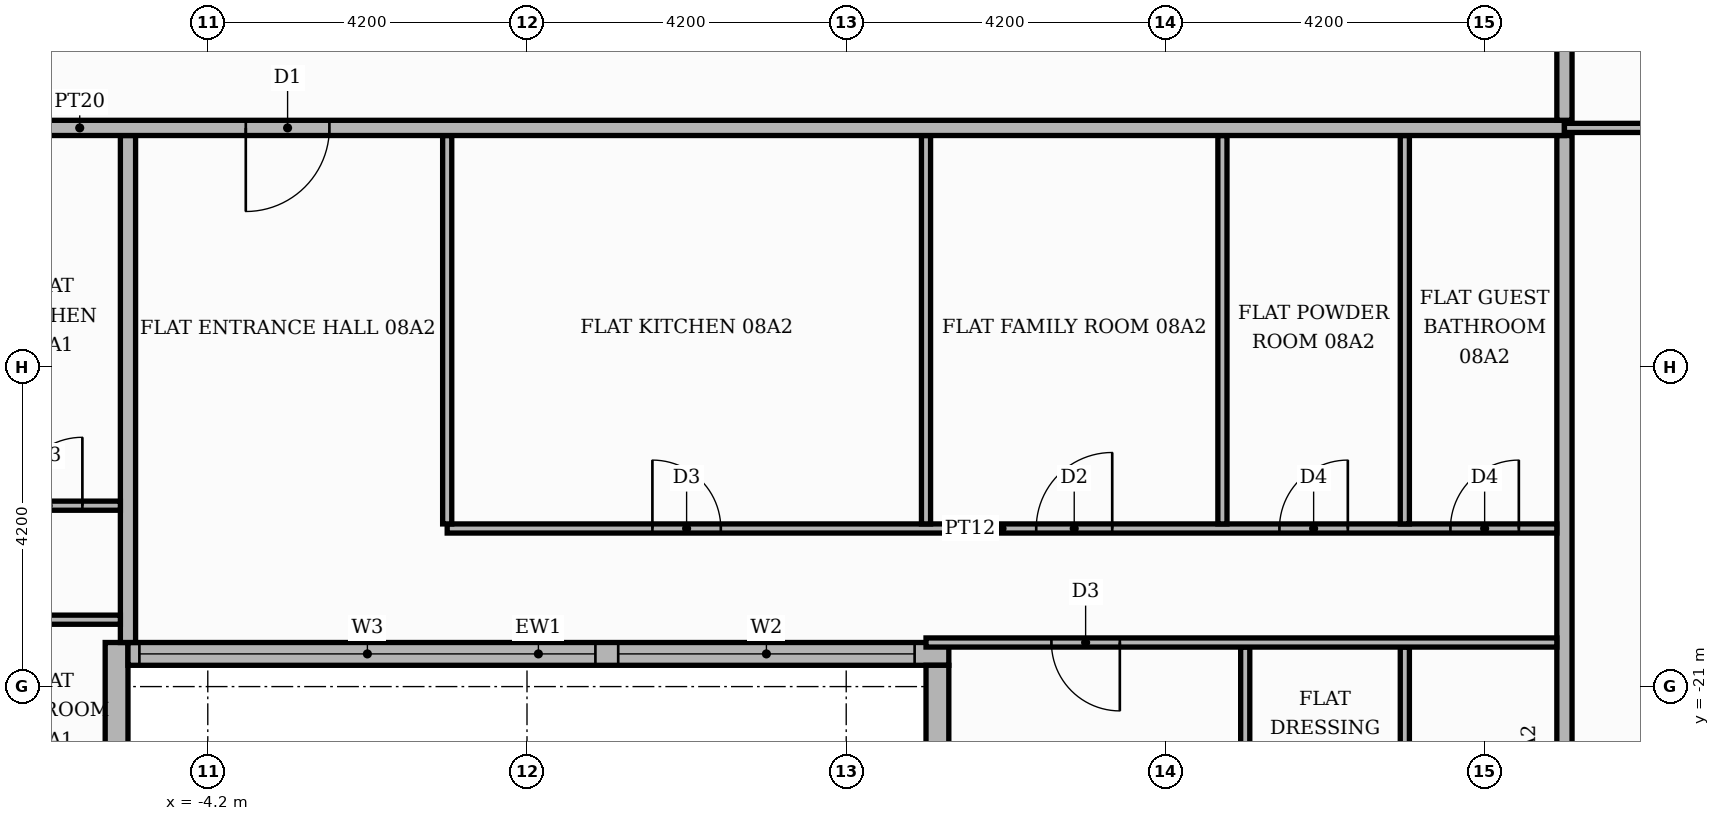
"""IFC4 building model, lengths in metres.
Left out: names, types, materials, properties, quantities, classifications, styles, units other than length and angle.
Written with IfcOpenShell. Run it as: python <this file> out.ifc"""

import sys

from ifc_helpers import new_model, si_unit, direction, frame, frame_2d, origin, place, context, subcontext, project, spatial, rectangle, extrude, element, fill, save


model = new_model("IFC4")
c1 = context("Model", 3, precision=1e-05, world=origin(), true_north=direction((0.0, 1.0)))
c2 = subcontext(c1, "Body", "Model", "MODEL_VIEW")
j1 = project(units=[si_unit("LENGTHUNIT", "METRE"), si_unit("PLANEANGLEUNIT", "RADIAN")], contexts=[c1])
p1 = place(None, origin())
s1 = spatial("IfcSite", under=j1, at=p1, CompositionType="ELEMENT")
p2 = place(p1, origin())
s2 = spatial("IfcBuilding", under=s1, at=p2, CompositionType="ELEMENT")
p3 = place(p2, frame((0.0, 0.0, 38.7)))
s3 = spatial("IfcBuildingStorey", under=s2, at=p3, CompositionType="ELEMENT", Elevation=38.7)
p4 = place(p3, frame((-5.4, -25.42, 0.0), z_axis=(0.0, 0.0, 1.0), x_axis=(0.0, 1.0, 0.0)))
e1 = element("IfcWall", 1, at=p4, inside=s3, PredefinedType="STANDARD", context=c2, shape_type="SweptSolid", body=[
    extrude(rectangle(XDim=5.0, YDim=0.3, at=frame_2d((2.5, 0.0))), origin(), (0.0, 0.0, 1.0), 3.48),
])
p5 = place(p4, frame((1.42, 0.0, 0.9)))
e2 = element("IfcOpeningElement", 2, at=p5, cuts=e1, PredefinedType="OPENING", context=c2, shape_type="SweptSolid", body=[
    extrude(rectangle(XDim=1.8, YDim=2.1, at=frame_2d((0.9, 1.05))), frame((0.0, 0.16, 0.0), z_axis=(0.0, -1.0, 0.0), x_axis=(1.0, 0.0, 0.0)), (0.0, 0.0, 1.0), 0.32),
])
p6 = place(p3, frame((-5.25, -20.57, 0.0), z_axis=(0.0, 0.0, 1.0), x_axis=(1.0, 0.0, 0.0)))
e3 = element("IfcWall", 3, at=p6, inside=s3, PredefinedType="STANDARD", context=c2, shape_type="SweptSolid", body=[
    extrude(rectangle(XDim=10.8, YDim=0.3, at=frame_2d((5.4, 0.0))), origin(), (0.0, 0.0, 1.0), 3.48),
])
p7 = place(p6, frame((0.15, 0.0, 0.9)))
e4 = element("IfcOpeningElement", 4, at=p7, cuts=e3, PredefinedType="OPENING", context=c2, shape_type="SweptSolid", body=[
    extrude(rectangle(XDim=6.0, YDim=2.1, at=frame_2d((3.0, 1.05))), frame((0.0, 0.16, 0.0), z_axis=(0.0, -1.0, 0.0), x_axis=(1.0, 0.0, 0.0)), (0.0, 0.0, 1.0), 0.32),
])
p8 = place(p6, frame((6.45, 0.0, 0.9)))
e5 = element("IfcOpeningElement", 5, at=p8, cuts=e3, PredefinedType="OPENING", context=c2, shape_type="SweptSolid", body=[
    extrude(rectangle(XDim=3.9, YDim=2.1, at=frame_2d((1.95, 1.05))), frame((0.0, 0.16, 0.0), z_axis=(0.0, -1.0, 0.0), x_axis=(1.0, 0.0, 0.0)), (0.0, 0.0, 1.0), 0.32),
])
p9 = place(p3, frame((5.4, -20.72, 0.0), z_axis=(0.0, 0.0, 1.0), x_axis=(0.0, -1.0, 0.0)))
e6 = element("IfcWall", 6, at=p9, inside=s3, PredefinedType="STANDARD", context=c2, shape_type="SweptSolid", body=[
    extrude(rectangle(XDim=5.0, YDim=0.3, at=frame_2d((2.5, 0.0))), origin(), (0.0, 0.0, 1.0), 3.48),
])
p10 = place(p9, frame((1.48, 0.0, 0.9)))
e7 = element("IfcOpeningElement", 7, at=p10, cuts=e6, PredefinedType="OPENING", context=c2, shape_type="SweptSolid", body=[
    extrude(rectangle(XDim=1.8, YDim=2.1, at=frame_2d((0.9, 1.05))), frame((0.0, 0.16, 0.0), z_axis=(0.0, -1.0, 0.0), x_axis=(1.0, 0.0, 0.0)), (0.0, 0.0, 1.0), 0.32),
])
p11 = place(p3, frame((9.45, -25.42, 0.0), z_axis=(0.0, 0.0, 1.0), x_axis=(0.0, 1.0, 0.0)))
e8 = element("IfcWall", 8, at=p11, inside=s3, PredefinedType="PARTITIONING", context=c2, shape_type="SweptSolid", body=[
    extrude(rectangle(XDim=4.94, YDim=0.12, at=frame_2d((2.47, 0.0))), origin(), (0.0, 0.0, 1.0), 3.48),
])
p12 = place(p11, frame((1.9, 0.0, 0.0)))
e9 = element("IfcOpeningElement", 9, at=p12, cuts=e8, PredefinedType="OPENING", context=c2, shape_type="SweptSolid", body=[
    extrude(rectangle(XDim=0.9, YDim=2.1, at=frame_2d((0.45, 1.05))), frame((0.0, 0.07, 0.0), z_axis=(0.0, -1.0, 0.0), x_axis=(1.0, 0.0, 0.0)), (0.0, 0.0, 1.0), 0.14),
])
p13 = place(p3, frame((11.55, -25.42, 0.0), z_axis=(0.0, 0.0, 1.0), x_axis=(0.0, 1.0, 0.0)))
e10 = element("IfcWall", 10, at=p13, inside=s3, PredefinedType="PARTITIONING", context=c2, shape_type="SweptSolid", body=[
    extrude(rectangle(XDim=4.94, YDim=0.12, at=frame_2d((2.47, 0.0))), origin(), (0.0, 0.0, 1.0), 3.48),
])
p14 = place(p13, frame((1.9, 0.0, 0.0)))
e11 = element("IfcOpeningElement", 11, at=p14, cuts=e10, PredefinedType="OPENING", context=c2, shape_type="SweptSolid", body=[
    extrude(rectangle(XDim=0.9, YDim=2.1, at=frame_2d((0.45, 1.05))), frame((0.0, 0.07, 0.0), z_axis=(0.0, -1.0, 0.0), x_axis=(1.0, 0.0, 0.0)), (0.0, 0.0, 1.0), 0.14),
])
p15 = place(p3, frame((13.65, -25.42, 0.0), z_axis=(0.0, 0.0, 1.0), x_axis=(0.0, 1.0, 0.0)))
e12 = element("IfcWall", 12, at=p15, inside=s3, PredefinedType="PARTITIONING", context=c2, shape_type="SweptSolid", body=[
    extrude(rectangle(XDim=11.67, YDim=0.2, at=frame_2d((5.835, 0.0))), origin(), (0.0, 0.0, 1.0), 3.48),
])
p16 = place(p3, frame((-5.25, -20.42, 0.0), z_axis=(0.0, 0.0, 1.0), x_axis=(0.0, 1.0, 0.0)))
e13 = element("IfcWall", 13, at=p16, inside=s3, PredefinedType="PARTITIONING", context=c2, shape_type="SweptSolid", body=[
    extrude(rectangle(XDim=6.67, YDim=0.2, at=frame_2d((3.335, 0.0))), origin(), (0.0, 0.0, 1.0), 3.48),
])
p17 = place(p3, frame((5.25, -20.42, 0.0), z_axis=(0.0, 0.0, 1.0), x_axis=(1.0, 0.0, 0.0)))
e14 = element("IfcWall", 14, at=p17, inside=s3, PredefinedType="PARTITIONING", context=c2, shape_type="SweptSolid", body=[
    extrude(rectangle(XDim=8.3, YDim=0.12, at=frame_2d((4.15, 0.0))), origin(), (0.0, 0.0, 1.0), 3.48),
])
p18 = place(p17, frame((1.65, 0.0, 0.0)))
e15 = element("IfcOpeningElement", 15, at=p18, cuts=e14, PredefinedType="OPENING", context=c2, shape_type="SweptSolid", body=[
    extrude(rectangle(XDim=0.9, YDim=2.1, at=frame_2d((0.45, 1.05))), frame((0.0, 0.07, 0.0), z_axis=(0.0, -1.0, 0.0), x_axis=(1.0, 0.0, 0.0)), (0.0, 0.0, 1.0), 0.14),
])
p19 = place(p3, frame((-17.3, -20.12, 0.0), z_axis=(0.0, 0.0, 1.0), x_axis=(1.0, 0.0, 0.0)))
e16 = element("IfcWall", 16, at=p19, inside=s3, PredefinedType="PARTITIONING", context=c2, shape_type="SweptSolid", body=[
    extrude(rectangle(XDim=11.95, YDim=0.12, at=frame_2d((5.975, 0.0))), origin(), (0.0, 0.0, 1.0), 3.48),
])
p20 = place(p19, frame((2.1, 0.0, 0.0)))
e17 = element("IfcOpeningElement", 17, at=p20, cuts=e16, PredefinedType="OPENING", context=c2, shape_type="SweptSolid", body=[
    extrude(rectangle(XDim=1.0, YDim=2.1, at=frame_2d((0.5, 1.05))), frame((0.0, 0.07, 0.0), z_axis=(0.0, -1.0, 0.0), x_axis=(1.0, 0.0, 0.0)), (0.0, 0.0, 1.0), 0.14),
])
p21 = place(p19, frame((5.3, 0.0, 0.0)))
e18 = element("IfcOpeningElement", 18, at=p21, cuts=e16, PredefinedType="OPENING", context=c2, shape_type="SweptSolid", body=[
    extrude(rectangle(XDim=0.9, YDim=2.1, at=frame_2d((0.45, 1.05))), frame((0.0, 0.07, 0.0), z_axis=(0.0, -1.0, 0.0), x_axis=(1.0, 0.0, 0.0)), (0.0, 0.0, 1.0), 0.14),
])
p22 = place(p3, frame((-1.05, -18.92, 0.0), z_axis=(0.0, 0.0, 1.0), x_axis=(1.0, 0.0, 0.0)))
e19 = element("IfcWall", 19, at=p22, inside=s3, PredefinedType="PARTITIONING", context=c2, shape_type="SweptSolid", body=[
    extrude(rectangle(XDim=14.6, YDim=0.12, at=frame_2d((7.3, 0.0))), origin(), (0.0, 0.0, 1.0), 3.48),
])
p23 = place(p22, frame((2.7, 0.0, 0.0)))
e20 = element("IfcOpeningElement", 20, at=p23, cuts=e19, PredefinedType="OPENING", context=c2, shape_type="SweptSolid", body=[
    extrude(rectangle(XDim=0.9, YDim=2.1, at=frame_2d((0.45, 1.05))), frame((0.0, 0.07, 0.0), z_axis=(0.0, -1.0, 0.0), x_axis=(1.0, 0.0, 0.0)), (0.0, 0.0, 1.0), 0.14),
])
p24 = place(p22, frame((7.75, 0.0, 0.0)))
e21 = element("IfcOpeningElement", 21, at=p24, cuts=e19, PredefinedType="OPENING", context=c2, shape_type="SweptSolid", body=[
    extrude(rectangle(XDim=1.0, YDim=2.1, at=frame_2d((0.5, 1.05))), frame((0.0, 0.07, 0.0), z_axis=(0.0, -1.0, 0.0), x_axis=(1.0, 0.0, 0.0)), (0.0, 0.0, 1.0), 0.14),
])
p25 = place(p22, frame((10.95, 0.0, 0.0)))
e22 = element("IfcOpeningElement", 22, at=p25, cuts=e19, PredefinedType="OPENING", context=c2, shape_type="SweptSolid", body=[
    extrude(rectangle(XDim=0.9, YDim=2.1, at=frame_2d((0.45, 1.05))), frame((0.0, 0.07, 0.0), z_axis=(0.0, -1.0, 0.0), x_axis=(1.0, 0.0, 0.0)), (0.0, 0.0, 1.0), 0.14),
])
p26 = place(p22, frame((13.2, 0.0, 0.0)))
e23 = element("IfcOpeningElement", 23, at=p26, cuts=e19, PredefinedType="OPENING", context=c2, shape_type="SweptSolid", body=[
    extrude(rectangle(XDim=0.9, YDim=2.1, at=frame_2d((0.45, 1.05))), frame((0.0, 0.07, 0.0), z_axis=(0.0, -1.0, 0.0), x_axis=(1.0, 0.0, 0.0)), (0.0, 0.0, 1.0), 0.14),
])
for number, where, z_axis, x_axis in (
    (24, (-1.05, -18.86, 0.0), (0.0, 0.0, 1.0), (0.0, 1.0, 0.0)),
    (25, (5.25, -18.86, 0.0), (0.0, 0.0, 1.0), (0.0, 1.0, 0.0)),
    (26, (9.15, -18.86, 0.0), (0.0, 0.0, 1.0), (0.0, 1.0, 0.0)),
    (27, (11.55, -18.86, 0.0), (0.0, 0.0, 1.0), (0.0, 1.0, 0.0)),
):
    element("IfcWall", number, at=place(p3, frame(where, z_axis=z_axis, x_axis=x_axis)), inside=s3, PredefinedType="PARTITIONING", context=c2, shape_type="SweptSolid", body=[
        extrude(rectangle(XDim=5.11, YDim=0.12, at=frame_2d((2.555, 0.0))), origin(), (0.0, 0.0, 1.0), 3.48),
    ])
p27 = place(p3, frame((-9.45, -18.62, 0.0), z_axis=(0.0, 0.0, 1.0), x_axis=(1.0, 0.0, 0.0)))
e28 = element("IfcWall", 28, at=p27, inside=s3, PredefinedType="PARTITIONING", context=c2, shape_type="SweptSolid", body=[
    extrude(rectangle(XDim=4.1, YDim=0.12, at=frame_2d((2.05, 0.0))), origin(), (0.0, 0.0, 1.0), 3.48),
])
p28 = place(p27, frame((2.7, 0.0, 0.0)))
e29 = element("IfcOpeningElement", 29, at=p28, cuts=e28, PredefinedType="OPENING", context=c2, shape_type="SweptSolid", body=[
    extrude(rectangle(XDim=0.9, YDim=2.1, at=frame_2d((0.45, 1.05))), frame((0.0, 0.07, 0.0), z_axis=(0.0, -1.0, 0.0), x_axis=(1.0, 0.0, 0.0)), (0.0, 0.0, 1.0), 0.14),
])
p29 = place(p3, frame((-25.42, -13.65, 0.0), z_axis=(0.0, 0.0, 1.0), x_axis=(1.0, 0.0, 0.0)))
e30 = element("IfcWall", 30, at=p29, inside=s3, PredefinedType="PARTITIONING", context=c2, shape_type="SweptSolid", body=[
    extrude(rectangle(XDim=39.07, YDim=0.2, at=frame_2d((19.535, 0.0))), origin(), (0.0, 0.0, 1.0), 3.48),
])
p30 = place(p29, frame((13.32, 0.0, 0.0)))
e31 = element("IfcOpeningElement", 31, at=p30, cuts=e30, PredefinedType="OPENING", context=c2, shape_type="SweptSolid", body=[
    extrude(rectangle(XDim=1.1, YDim=2.4, at=frame_2d((0.55, 1.2))), frame((0.0, 0.11, 0.0), z_axis=(0.0, -1.0, 0.0), x_axis=(1.0, 0.0, 0.0)), (0.0, 0.0, 1.0), 0.22),
])
p31 = place(p29, frame((21.72, 0.0, 0.0)))
e32 = element("IfcOpeningElement", 32, at=p31, cuts=e30, PredefinedType="OPENING", context=c2, shape_type="SweptSolid", body=[
    extrude(rectangle(XDim=1.1, YDim=2.4, at=frame_2d((0.55, 1.2))), frame((0.0, 0.11, 0.0), z_axis=(0.0, -1.0, 0.0), x_axis=(1.0, 0.0, 0.0)), (0.0, 0.0, 1.0), 0.22),
])
p32 = place(p3, frame((13.65, -13.65, 0.0), z_axis=(0.0, 0.0, 1.0), x_axis=(1.0, 0.0, 0.0)))
e33 = element("IfcWall", 33, at=p32, inside=s3, PredefinedType="PARTITIONING", context=c2, shape_type="SweptSolid", body=[
    extrude(rectangle(XDim=6.17, YDim=0.12, at=frame_2d((3.085, 0.0))), origin(), (0.0, 0.0, 1.0), 3.48),
])
p33 = place(p32, frame((2.585, 0.0, 0.0)))
e34 = element("IfcOpeningElement", 34, at=p33, cuts=e33, PredefinedType="OPENING", context=c2, shape_type="SweptSolid", body=[
    extrude(rectangle(XDim=1.0, YDim=2.1, at=frame_2d((0.5, 1.05))), frame((0.0, 0.07, 0.0), z_axis=(0.0, -1.0, 0.0), x_axis=(1.0, 0.0, 0.0)), (0.0, 0.0, 1.0), 0.14),
])
p34 = place(p3, frame((13.65, -13.55, 0.0), z_axis=(0.0, 0.0, 1.0), x_axis=(0.0, 1.0, 0.0)))
e35 = element("IfcWall", 35, at=p34, inside=s3, PredefinedType="PARTITIONING", context=c2, shape_type="SweptSolid", body=[
    extrude(rectangle(XDim=27.1, YDim=0.2, at=frame_2d((13.55, 0.0))), origin(), (0.0, 0.0, 1.0), 3.48),
])
p35 = place(p34, frame((2.5, 0.0, 0.0)))
e36 = element("IfcOpeningElement", 36, at=p35, cuts=e35, PredefinedType="OPENING", context=c2, shape_type="SweptSolid", body=[
    extrude(rectangle(XDim=1.1, YDim=2.4, at=frame_2d((0.55, 1.2))), frame((0.0, 0.11, 0.0), z_axis=(0.0, -1.0, 0.0), x_axis=(1.0, 0.0, 0.0)), (0.0, 0.0, 1.0), 0.22),
])
p36 = place(p7, origin())
e37 = element("IfcWindow", 37, at=p36, inside=s3, PartitioningType="SINGLE_PANEL", PredefinedType="WINDOW", context=c2, shape_type="SweptSolid", body=[
    extrude(rectangle(XDim=6.0, YDim=2.1, at=frame_2d((3.0, 1.05))), frame((0.0, 0.03, 0.0), z_axis=(0.0, -1.0, 0.0), x_axis=(1.0, 0.0, 0.0)), (0.0, 0.0, 1.0), 0.06),
])
fill(e4, e37)
p37 = place(p8, origin())
e38 = element("IfcWindow", 38, at=p37, inside=s3, PartitioningType="SINGLE_PANEL", PredefinedType="WINDOW", context=c2, shape_type="SweptSolid", body=[
    extrude(rectangle(XDim=3.9, YDim=2.1, at=frame_2d((1.95, 1.05))), frame((0.0, 0.03, 0.0), z_axis=(0.0, -1.0, 0.0), x_axis=(1.0, 0.0, 0.0)), (0.0, 0.0, 1.0), 0.06),
])
fill(e5, e38)
p38 = place(p28, origin())
e39 = element("IfcDoor", 39, at=p38, inside=s3, OperationType="SINGLE_SWING_RIGHT", PredefinedType="DOOR", context=c2, shape_type="SweptSolid", body=[
    extrude(rectangle(XDim=0.9, YDim=2.1, at=frame_2d((0.45, 1.05))), frame((0.0, 0.025, 0.0), z_axis=(0.0, -1.0, 0.0), x_axis=(1.0, 0.0, 0.0)), (0.0, 0.0, 1.0), 0.05),
])
fill(e29, e39)
p39 = place(p31, frame((1.1, 0.0, 0.0), z_axis=(0.0, 0.0, 1.0), x_axis=(-1.0, 0.0, 0.0)))
e40 = element("IfcDoor", 40, at=p39, inside=s3, OperationType="SINGLE_SWING_LEFT", PredefinedType="DOOR", context=c2, shape_type="SweptSolid", body=[
    extrude(rectangle(XDim=1.1, YDim=2.4, at=frame_2d((0.55, 1.2))), frame((0.0, 0.025, 0.0), z_axis=(0.0, -1.0, 0.0), x_axis=(1.0, 0.0, 0.0)), (0.0, 0.0, 1.0), 0.05),
])
fill(e32, e40)
p40 = place(p23, origin())
e41 = element("IfcDoor", 41, at=p40, inside=s3, OperationType="SINGLE_SWING_LEFT", PredefinedType="DOOR", context=c2, shape_type="SweptSolid", body=[
    extrude(rectangle(XDim=0.9, YDim=2.1, at=frame_2d((0.45, 1.05))), frame((0.0, 0.025, 0.0), z_axis=(0.0, -1.0, 0.0), x_axis=(1.0, 0.0, 0.0)), (0.0, 0.0, 1.0), 0.05),
])
fill(e20, e41)
p41 = place(p24, origin())
e42 = element("IfcDoor", 42, at=p41, inside=s3, OperationType="SINGLE_SWING_RIGHT", PredefinedType="DOOR", context=c2, shape_type="SweptSolid", body=[
    extrude(rectangle(XDim=1.0, YDim=2.1, at=frame_2d((0.5, 1.05))), frame((0.0, 0.025, 0.0), z_axis=(0.0, -1.0, 0.0), x_axis=(1.0, 0.0, 0.0)), (0.0, 0.0, 1.0), 0.05),
])
fill(e21, e42)
p42 = place(p25, origin())
e43 = element("IfcDoor", 43, at=p42, inside=s3, OperationType="SINGLE_SWING_RIGHT", PredefinedType="DOOR", context=c2, shape_type="SweptSolid", body=[
    extrude(rectangle(XDim=0.9, YDim=2.1, at=frame_2d((0.45, 1.05))), frame((0.0, 0.025, 0.0), z_axis=(0.0, -1.0, 0.0), x_axis=(1.0, 0.0, 0.0)), (0.0, 0.0, 1.0), 0.05),
])
fill(e22, e43)
p43 = place(p26, origin())
e44 = element("IfcDoor", 44, at=p43, inside=s3, OperationType="SINGLE_SWING_RIGHT", PredefinedType="DOOR", context=c2, shape_type="SweptSolid", body=[
    extrude(rectangle(XDim=0.9, YDim=2.1, at=frame_2d((0.45, 1.05))), frame((0.0, 0.025, 0.0), z_axis=(0.0, -1.0, 0.0), x_axis=(1.0, 0.0, 0.0)), (0.0, 0.0, 1.0), 0.05),
])
fill(e23, e44)
p44 = place(p18, frame((0.9, 0.0, 0.0), z_axis=(0.0, 0.0, 1.0), x_axis=(-1.0, 0.0, 0.0)))
e45 = element("IfcDoor", 45, at=p44, inside=s3, OperationType="SINGLE_SWING_RIGHT", PredefinedType="DOOR", context=c2, shape_type="SweptSolid", body=[
    extrude(rectangle(XDim=0.9, YDim=2.1, at=frame_2d((0.45, 1.05))), frame((0.0, 0.025, 0.0), z_axis=(0.0, -1.0, 0.0), x_axis=(1.0, 0.0, 0.0)), (0.0, 0.0, 1.0), 0.05),
])
fill(e15, e45)
save(model, sys.argv[1])
